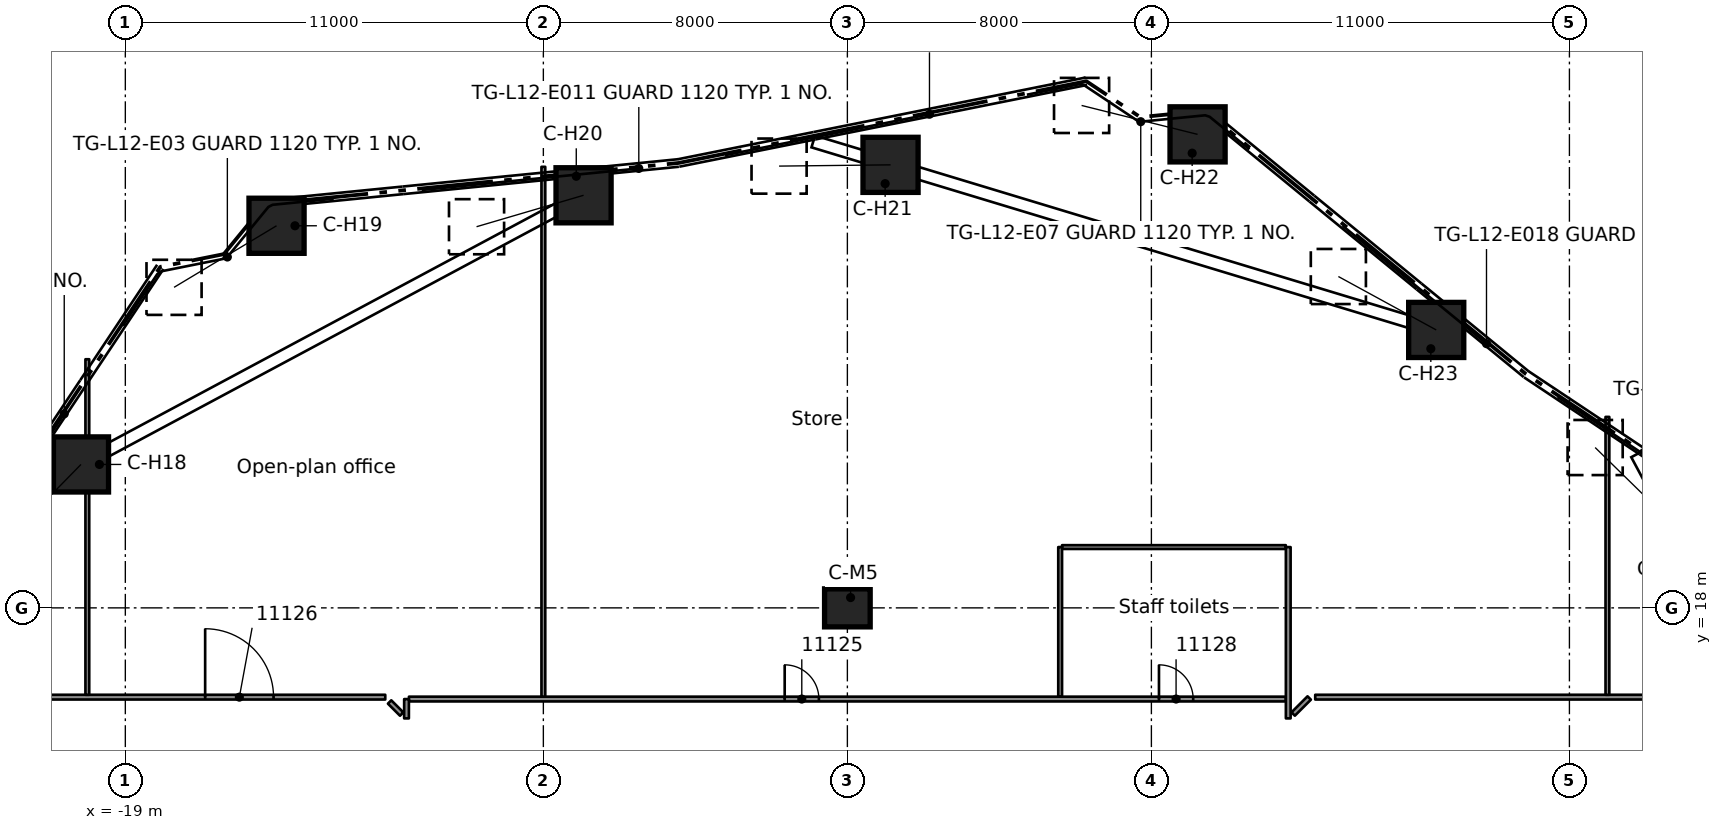
"""IFC4 building model, lengths in metres.
Left out: names, types, materials, properties, quantities, classifications, styles, units other than length and angle.
Written with IfcOpenShell. Run it as: python <this file> out.ifc"""

import sys

from ifc_helpers import new_model, si_unit, direction, frame, frame_2d, origin, origin_2d, place, context, subcontext, project, spatial, rectangle, extrude, element, fill, save


model = new_model("IFC4")
c1 = context("Model", 3, precision=1e-05, world=origin(), true_north=direction((0.0, 1.0)))
c2 = subcontext(c1, "Body", "Model", "MODEL_VIEW")
j1 = project(units=[si_unit("LENGTHUNIT", "METRE"), si_unit("PLANEANGLEUNIT", "RADIAN")], contexts=[c1])
p1 = place(None, origin())
s1 = spatial("IfcSite", under=j1, at=p1, CompositionType="ELEMENT")
p2 = place(p1, origin())
s2 = spatial("IfcBuilding", under=s1, at=p2, CompositionType="ELEMENT")
p3 = place(p2, frame((0.0, 0.0, 54.8)))
s3 = spatial("IfcBuildingStorey", under=s2, at=p3, CompositionType="ELEMENT", Elevation=54.8)
p4 = place(p3, frame((-20.167, 21.774, 0.508), z_axis=(-0.490424057431, -0.501160289027, 0.712967466716), x_axis=(0.714720981693, -0.699409692761, 0.0)))
e1 = element("IfcColumn", 1, at=p4, inside=s3, PredefinedType="COLUMN", context=c2, shape_type="SweptSolid", body=[
    extrude(rectangle(XDim=1.45, YDim=1.45, at=origin_2d()), origin(), (0.0, 0.0, 1.0), 4.184),
])
p5 = place(p3, frame((-15.021, 28.054, 0.53), z_axis=(-0.626275485165, -0.376150796059, 0.682854007315), x_axis=(0.514883708566, -0.857260034443, 0.0)))
e2 = element("IfcColumn", 2, at=p5, inside=s3, PredefinedType="COLUMN", context=c2, shape_type="SweptSolid", body=[
    extrude(rectangle(XDim=1.45, YDim=1.45, at=origin_2d()), origin(), (0.0, 0.0, 1.0), 4.306),
])
p6 = place(p3, frame((-6.942, 28.856, 0.509), z_axis=(-0.672955189678, -0.197598545942, 0.712801604464), x_axis=(0.281733966191, -0.959492559791, 0.0)))
e3 = element("IfcColumn", 3, at=p6, inside=s3, PredefinedType="COLUMN", context=c2, shape_type="SweptSolid", body=[
    extrude(rectangle(XDim=1.45, YDim=1.45, at=origin_2d()), origin(), (0.0, 0.0, 1.0), 4.185),
])
p7 = place(p3, frame((1.136, 29.657, 0.508), z_axis=(-0.701048970737, -0.007877610375, 0.713069620643), x_axis=(0.011236180934, -0.999936872126, 0.0)))
e4 = element("IfcColumn", 4, at=p7, inside=s3, PredefinedType="COLUMN", context=c2, shape_type="SweptSolid", body=[
    extrude(rectangle(XDim=1.45, YDim=1.45, at=origin_2d()), origin(), (0.0, 0.0, 1.0), 4.184),
])
p8 = place(p3, frame((9.215, 30.459, 0.53), z_axis=(-0.708756376313, 0.176721352289, 0.682959707948), x_axis=(-0.241932903281, -0.970292981686, 0.0)))
e5 = element("IfcColumn", 5, at=p8, inside=s3, PredefinedType="COLUMN", context=c2, shape_type="SweptSolid", body=[
    extrude(rectangle(XDim=1.45, YDim=1.45, at=origin_2d()), origin(), (0.0, 0.0, 1.0), 4.306),
])
p9 = place(p3, frame((15.495, 25.313, 0.508), z_axis=(-0.61545416164, 0.336025835882, 0.71295358372), x_axis=(-0.479207722379, -0.877701520343, 0.0)))
e6 = element("IfcColumn", 6, at=p9, inside=s3, PredefinedType="COLUMN", context=c2, shape_type="SweptSolid", body=[
    extrude(rectangle(XDim=1.45, YDim=1.45, at=origin_2d()), origin(), (0.0, 0.0, 1.0), 4.184),
])
p10 = place(p3, frame((21.774, 20.167, 0.508), z_axis=(-0.501160289027, 0.490424057431, 0.712967466716), x_axis=(-0.699409692761, -0.714720981693, 0.0)))
e7 = element("IfcColumn", 7, at=p10, inside=s3, PredefinedType="COLUMN", context=c2, shape_type="SweptSolid", body=[
    extrude(rectangle(XDim=1.45, YDim=1.45, at=origin_2d()), origin(), (0.0, 0.0, 1.0), 4.184),
])
p11 = place(p3, frame((0.0, 18.0, 0.0), z_axis=(0.0, 0.0, 1.0), x_axis=(1.0, 0.0, 0.0)))
e8 = element("IfcColumn", 8, at=p11, inside=s3, PredefinedType="COLUMN", context=c2, shape_type="SweptSolid", body=[
    extrude(rectangle(XDim=1.2, YDim=1.0, at=origin_2d()), origin(), (0.0, 0.0, 1.0), 4.0),
])
p12 = place(p3, frame((-12.046, 15.524, 0.0), z_axis=(0.0, 0.0, 1.0), x_axis=(0.707106781187, -0.707106781187, 0.0)))
e9 = element("IfcWall", 9, at=p12, inside=s3, PredefinedType="PARTITIONING", context=c2, shape_type="SweptSolid", body=[
    extrude(rectangle(XDim=0.449, YDim=0.125, at=frame_2d((0.225, 0.0))), origin(), (0.0, 0.0, 1.0), 3.58),
])
p13 = place(p3, frame((-11.537, 15.601, 0.0), z_axis=(0.0, 0.0, 1.0), x_axis=(1.0, 0.0, 0.0)))
e10 = element("IfcWall", 10, at=p13, inside=s3, PredefinedType="PARTITIONING", context=c2, shape_type="SweptSolid", body=[
    extrude(rectangle(XDim=23.074, YDim=0.125, at=frame_2d((11.537, 0.0))), origin(), (0.0, 0.0, 1.0), 3.58),
])
p14 = place(p13, frame((9.887, 0.0, 0.0)))
e11 = element("IfcOpeningElement", 11, at=p14, cuts=e10, PredefinedType="OPENING", context=c2, shape_type="SweptSolid", body=[
    extrude(rectangle(XDim=0.9, YDim=2.1, at=frame_2d((0.45, 1.05))), frame((0.0, 0.073, 0.0), z_axis=(0.0, -1.0, 0.0), x_axis=(1.0, 0.0, 0.0)), (0.0, 0.0, 1.0), 0.145),
])
p15 = place(p13, frame((19.737, 0.0, 0.0)))
e12 = element("IfcOpeningElement", 12, at=p15, cuts=e10, PredefinedType="OPENING", context=c2, shape_type="SweptSolid", body=[
    extrude(rectangle(XDim=0.9, YDim=2.1, at=frame_2d((0.45, 1.05))), frame((0.0, 0.073, 0.0), z_axis=(0.0, -1.0, 0.0), x_axis=(1.0, 0.0, 0.0)), (0.0, 0.0, 1.0), 0.145),
])
p16 = place(p3, frame((-22.587, 15.651, 0.0), z_axis=(0.0, 0.0, 1.0), x_axis=(1.0, 0.0, 0.0)))
e13 = element("IfcWall", 13, at=p16, inside=s3, PredefinedType="PARTITIONING", context=c2, shape_type="SweptSolid", body=[
    extrude(rectangle(XDim=10.427, YDim=0.125, at=frame_2d((5.213, 0.0))), origin(), (0.0, 0.0, 1.0), 3.58),
])
p17 = place(p16, frame((5.688, 0.0, 0.0)))
e14 = element("IfcOpeningElement", 14, at=p17, cuts=e13, PredefinedType="OPENING", context=c2, shape_type="SweptSolid", body=[
    extrude(rectangle(XDim=1.8, YDim=2.1, at=frame_2d((0.9, 1.05))), frame((0.0, 0.073, 0.0), z_axis=(0.0, -1.0, 0.0), x_axis=(1.0, 0.0, 0.0)), (0.0, 0.0, 1.0), 0.145),
])
p18 = place(p3, frame((12.311, 15.651, 0.0), z_axis=(0.0, 0.0, 1.0), x_axis=(1.0, 0.0, 0.0)))
e15 = element("IfcWall", 15, at=p18, inside=s3, PredefinedType="PARTITIONING", context=c2, shape_type="SweptSolid", body=[
    extrude(rectangle(XDim=10.276, YDim=0.125, at=frame_2d((5.138, 0.0))), origin(), (0.0, 0.0, 1.0), 3.58),
])
p19 = place(p3, frame((5.649, 19.6, 0.0), z_axis=(0.0, 0.0, 1.0), x_axis=(1.0, 0.0, 0.0)))
e16 = element("IfcWall", 16, at=p19, inside=s3, PredefinedType="PARTITIONING", context=c2, shape_type="SweptSolid", body=[
    extrude(rectangle(XDim=5.888, YDim=0.1, at=frame_2d((2.944, 0.0))), origin(), (0.0, 0.0, 1.0), 3.58),
])
p20 = place(p3, frame((11.731, 15.207, 0.0), z_axis=(0.0, 0.0, 1.0), x_axis=(0.707311295066, 0.70690220814, 0.0)))
e17 = element("IfcWall", 17, at=p20, inside=s3, PredefinedType="PARTITIONING", context=c2, shape_type="SweptSolid", body=[
    extrude(rectangle(XDim=0.597, YDim=0.125, at=frame_2d((0.298, 0.0))), origin(), (0.0, 0.0, 1.0), 3.58),
])
p21 = place(p3, frame((-11.601, 15.092, 0.0), z_axis=(0.0, 0.0, 1.0), x_axis=(0.00192214926, 0.999998152669, 0.0)))
e18 = element("IfcWall", 18, at=p21, inside=s3, PredefinedType="PARTITIONING", context=c2, shape_type="SweptSolid", body=[
    extrude(rectangle(XDim=0.508, YDim=0.125, at=frame_2d((0.254, 0.0))), origin(), (0.0, 0.0, 1.0), 3.58),
])
p22 = place(p3, frame((20.0, 15.713, 0.0), z_axis=(0.0, 0.0, 1.0), x_axis=(0.0, 1.0, 0.0)))
e19 = element("IfcWall", 19, at=p22, inside=s3, PredefinedType="PARTITIONING", context=c2, shape_type="SweptSolid", body=[
    extrude(rectangle(XDim=7.312, YDim=0.1, at=frame_2d((3.656, 0.0))), origin(), (0.0, 0.0, 1.0), 3.58),
])
p23 = place(p3, frame((11.601, 15.092, 0.0), z_axis=(0.0, 0.0, 1.0), x_axis=(0.0, 1.0, 0.0)))
e20 = element("IfcWall", 20, at=p23, inside=s3, PredefinedType="PARTITIONING", context=c2, shape_type="SweptSolid", body=[
    extrude(rectangle(XDim=4.507, YDim=0.125, at=frame_2d((2.253, 0.0))), origin(), (0.0, 0.0, 1.0), 3.58),
])
p24 = place(p3, frame((5.599, 15.664, 0.0), z_axis=(0.0, 0.0, 1.0), x_axis=(0.0, 1.0, 0.0)))
e21 = element("IfcWall", 21, at=p24, inside=s3, PredefinedType="PARTITIONING", context=c2, shape_type="SweptSolid", body=[
    extrude(rectangle(XDim=3.936, YDim=0.1, at=frame_2d((1.968, 0.0))), origin(), (0.0, 0.0, 1.0), 3.58),
])
p25 = place(p3, frame((-8.0, 15.664, 0.0), z_axis=(0.0, 0.0, 1.0), x_axis=(0.0, 1.0, 0.0)))
e22 = element("IfcWall", 22, at=p25, inside=s3, PredefinedType="PARTITIONING", context=c2, shape_type="SweptSolid", body=[
    extrude(rectangle(XDim=13.941, YDim=0.1, at=frame_2d((6.97, 0.0))), origin(), (0.0, 0.0, 1.0), 3.58),
])
p26 = place(p3, frame((-20.0, 15.713, 0.0), z_axis=(0.0, 0.0, 1.0), x_axis=(0.0, 1.0, 0.0)))
e23 = element("IfcWall", 23, at=p26, inside=s3, PredefinedType="PARTITIONING", context=c2, shape_type="SweptSolid", body=[
    extrude(rectangle(XDim=8.829, YDim=0.1, at=frame_2d((4.415, 0.0))), origin(), (0.0, 0.0, 1.0), 3.58),
])
p27 = place(p14, origin())
e24 = element("IfcDoor", 24, at=p27, inside=s3, OperationType="SINGLE_SWING_LEFT", PredefinedType="DOOR", context=c2, shape_type="SweptSolid", body=[
    extrude(rectangle(XDim=0.9, YDim=2.1, at=frame_2d((0.45, 1.05))), frame((0.0, 0.025, 0.0), z_axis=(0.0, -1.0, 0.0), x_axis=(1.0, 0.0, 0.0)), (0.0, 0.0, 1.0), 0.05),
])
fill(e11, e24)
p28 = place(p17, origin())
e25 = element("IfcDoor", 25, at=p28, inside=s3, OperationType="DOUBLE_DOOR_SINGLE_SWING", PredefinedType="DOOR", context=c2, shape_type="SweptSolid", body=[
    extrude(rectangle(XDim=1.8, YDim=2.1, at=frame_2d((0.9, 1.05))), frame((0.0, 0.025, 0.0), z_axis=(0.0, -1.0, 0.0), x_axis=(1.0, 0.0, 0.0)), (0.0, 0.0, 1.0), 0.05),
])
fill(e14, e25)
p29 = place(p15, origin())
e26 = element("IfcDoor", 26, at=p29, inside=s3, OperationType="SINGLE_SWING_RIGHT", PredefinedType="DOOR", context=c2, shape_type="SweptSolid", body=[
    extrude(rectangle(XDim=0.9, YDim=2.1, at=frame_2d((0.45, 1.05))), frame((0.0, 0.025, 0.0), z_axis=(0.0, -1.0, 0.0), x_axis=(1.0, 0.0, 0.0)), (0.0, 0.0, 1.0), 0.05),
])
fill(e12, e26)
save(model, sys.argv[1])
